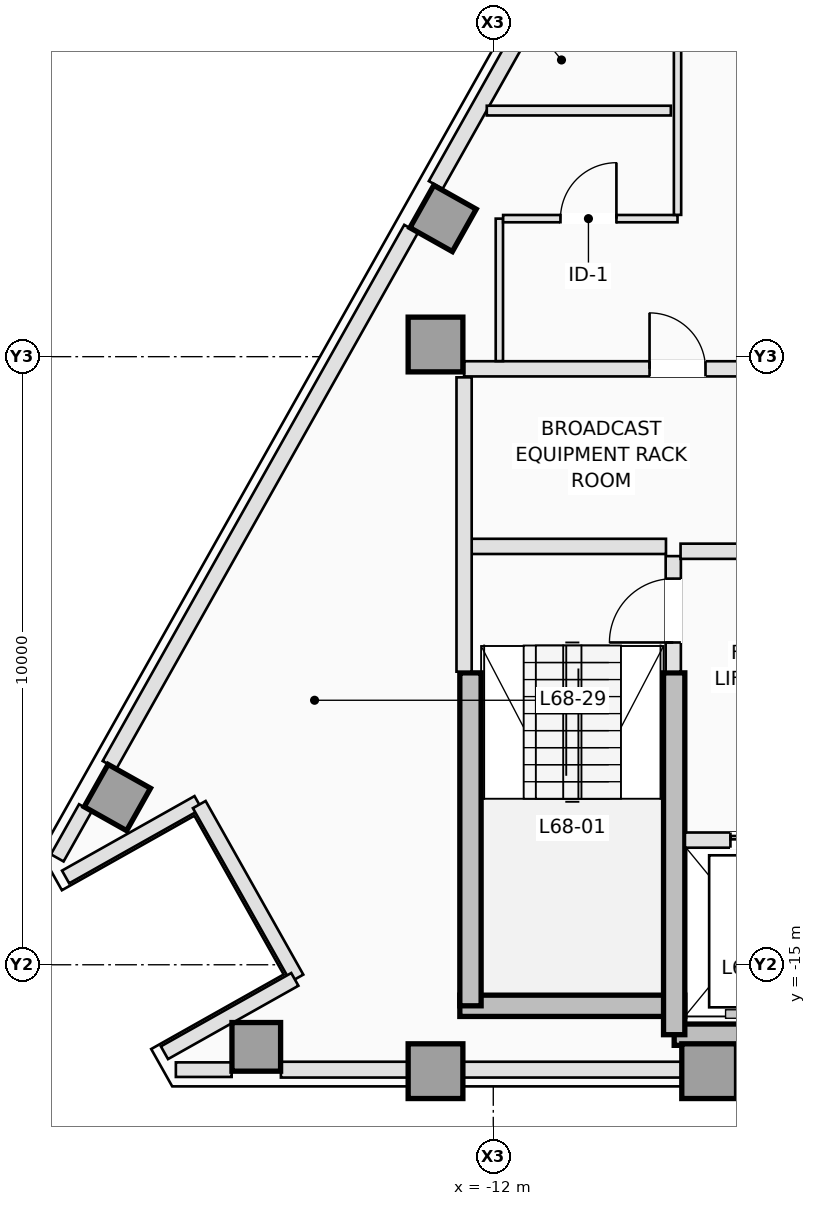
"""IFC4 building model, lengths in metres.
Left out: names, types, materials, properties, quantities, classifications, styles, units other than length and angle.
Written with IfcOpenShell. Run it as: python <this file> out.ifc"""

import sys

from ifc_helpers import new_model, si_unit, direction, frame, frame_2d, origin, origin_2d, place, context, subcontext, project, spatial, rectangle, extrude, element, fill, save


model = new_model("IFC4")
c1 = context("Model", 3, precision=1e-05, world=origin(), true_north=direction((0.0, 1.0)))
c2 = subcontext(c1, "Body", "Model", "MODEL_VIEW")
j1 = project(units=[si_unit("LENGTHUNIT", "METRE"), si_unit("PLANEANGLEUNIT", "RADIAN")], contexts=[c1])
p1 = place(None, origin())
s1 = spatial("IfcSite", under=j1, at=p1, CompositionType="ELEMENT")
p2 = place(p1, origin())
s2 = spatial("IfcBuilding", under=s1, at=p2, CompositionType="ELEMENT")
p3 = place(p2, frame((0.0, 0.0, 246.4)))
s3 = spatial("IfcBuildingStorey", under=s2, at=p3, CompositionType="ELEMENT", Elevation=246.4)
p4 = place(p3, frame((-12.55, -15.675, 0.0), z_axis=(0.0, 0.0, 1.0), x_axis=(1.0, 0.0, 0.0)))
e1 = element("IfcWall", 1, at=p4, inside=s3, PredefinedType="SHEAR", context=c2, shape_type="SweptSolid", body=[
    extrude(rectangle(XDim=3.7, YDim=0.35, at=frame_2d((1.85, 0.0))), origin(), (0.0, 0.0, 1.0), 3.5),
])
p5 = place(p3, frame((-9.025, -16.15, 0.0), z_axis=(0.0, 0.0, 1.0), x_axis=(1.0, 0.0, 0.0)))
e2 = element("IfcWall", 2, at=p5, inside=s3, PredefinedType="SHEAR", context=c2, shape_type="SweptSolid", body=[
    extrude(rectangle(XDim=5.275, YDim=0.35, at=frame_2d((2.637, 0.0))), origin(), (0.0, 0.0, 1.0), 3.5),
])
p6 = place(p3, frame((-12.375, -15.675, 0.0), z_axis=(0.0, 0.0, 1.0), x_axis=(0.0, 1.0, 0.0)))
e3 = element("IfcWall", 3, at=p6, inside=s3, PredefinedType="SHEAR", context=c2, shape_type="SweptSolid", body=[
    extrude(rectangle(XDim=5.475, YDim=0.35, at=frame_2d((2.738, 0.0))), origin(), (0.0, 0.0, 1.0), 3.5),
])
p7 = place(p3, frame((-9.025, -16.15, 0.0), z_axis=(0.0, 0.0, 1.0), x_axis=(0.0, 1.0, 0.0)))
e4 = element("IfcWall", 4, at=p7, inside=s3, PredefinedType="SHEAR", context=c2, shape_type="SweptSolid", body=[
    extrude(rectangle(XDim=5.95, YDim=0.35, at=frame_2d((2.975, 0.0))), origin(), (0.0, 0.0, 1.0), 3.5),
])
for number, where, z_axis, x_axis in (
    (5, (-12.95, -16.75, 0.0), (0.0, 0.0, 1.0), (1.0, 0.0, 0.0)),
    (6, (-8.45, -16.75, 0.0), (0.0, 0.0, 1.0), (1.0, 0.0, 0.0)),
    (7, (-12.95, -4.8, 0.0), (0.0, 0.0, 1.0), (1.0, 0.0, 0.0)),
):
    element("IfcColumn", number, at=place(p3, frame(where, z_axis=z_axis, x_axis=x_axis)), inside=s3, PredefinedType="COLUMN", context=c2, shape_type="SweptSolid", body=[
        extrude(rectangle(XDim=0.9, YDim=0.9, at=origin_2d()), origin(), (0.0, 0.0, 1.0), 3.5),
    ])
for number, where, z_axis, x_axis in (
    (8, (-15.898, -16.35, 0.0), (0.0, 0.0, 1.0), (0.0, 1.0, 0.0)),
    (9, (-12.825, -2.727, 0.0), (0.0, 0.0, 1.0), (-0.872, 0.49, 0.0)),
    (10, (-18.182, -12.25, 0.0), (0.0, 0.0, 1.0), (-0.872, 0.49, 0.0)),
):
    element("IfcColumn", number, at=place(p3, frame(where, z_axis=z_axis, x_axis=x_axis)), inside=s3, PredefinedType="COLUMN", context=c2, shape_type="SweptSolid", body=[
        extrude(rectangle(XDim=0.8, YDim=0.8, at=origin_2d()), origin(), (0.0, 0.0, 1.0), 3.5),
    ])
p8 = place(p3, frame((-16.302, -16.725, 0.0), z_axis=(0.0, 0.0, 1.0), x_axis=(-1.0, 0.0, 0.0)))
e11 = element("IfcWall", 11, at=p8, inside=s3, PredefinedType="STANDARD", context=c2, shape_type="SweptSolid", body=[
    extrude(rectangle(XDim=0.917, YDim=0.24, at=frame_2d((0.459, 0.0))), origin(), (0.0, 0.0, 1.0), 3.25),
])
p9 = place(p3, frame((-4.22, -16.725, 0.0), z_axis=(0.0, 0.0, 1.0), x_axis=(-1.0, 0.0, 0.0)))
e12 = element("IfcWall", 12, at=p9, inside=s3, PredefinedType="STANDARD", context=c2, shape_type="SweptSolid", body=[
    extrude(rectangle(XDim=11.273, YDim=0.26, at=frame_2d((5.636, 0.0))), origin(), (0.0, 0.0, 1.0), 2.79),
])
p10 = place(p3, frame((-19.171, -13.242, 0.0), z_axis=(0.0, 0.0, 1.0), x_axis=(0.490199895283, 0.871610040479, 0.0)))
e13 = element("IfcWall", 13, at=p10, inside=s3, PredefinedType="STANDARD", context=c2, shape_type="SweptSolid", body=[
    extrude(rectangle(XDim=0.945, YDim=0.24, at=frame_2d((0.472, 0.0))), origin(), (0.0, 0.0, 1.0), 3.25),
])
p11 = place(p3, frame((-18.311, -11.713, 0.0), z_axis=(0.0, 0.0, 1.0), x_axis=(0.490266968583, 0.871572314565, 0.0)))
e14 = element("IfcWall", 14, at=p11, inside=s3, PredefinedType="STANDARD", context=c2, shape_type="SweptSolid", body=[
    extrude(rectangle(XDim=10.116, YDim=0.26, at=frame_2d((5.058, 0.0))), origin(), (0.0, 0.0, 1.0), 3.25),
])
p12 = place(p3, frame((-12.946, -2.177, 0.0), z_axis=(0.0, 0.0, 1.0), x_axis=(0.490244825075, 0.871584770109, 0.0)))
e15 = element("IfcWall", 15, at=p12, inside=s3, PredefinedType="STANDARD", context=c2, shape_type="SweptSolid", body=[
    extrude(rectangle(XDim=4.237, YDim=0.26, at=frame_2d((2.119, 0.0))), origin(), (0.0, 0.0, 1.0), 3.25),
])
p13 = place(p3, frame((-19.033, -13.556, 0.0), z_axis=(0.0, 0.0, 1.0), x_axis=(0.871588577066, 0.490238056792, 0.0)))
e16 = element("IfcWall", 16, at=p13, inside=s3, PredefinedType="STANDARD", context=c2, shape_type="SweptSolid", body=[
    extrude(rectangle(XDim=2.5, YDim=0.24, at=frame_2d((1.25, 0.0))), origin(), (0.0, 0.0, 1.0), 3.25),
])
p14 = place(p3, frame((-16.835, -12.366, 0.0), z_axis=(0.0, 0.0, 1.0), x_axis=(0.490293083368, -0.871557624258, 0.0)))
e17 = element("IfcWall", 17, at=p14, inside=s3, PredefinedType="STANDARD", context=c2, shape_type="SweptSolid", body=[
    extrude(rectangle(XDim=3.276, YDim=0.24, at=frame_2d((1.638, 0.0))), origin(), (0.0, 0.0, 1.0), 2.79),
])
p15 = place(p3, frame((-15.264, -15.24, 0.0), z_axis=(0.0, 0.0, 1.0), x_axis=(-0.87157023615, -0.490270663468, 0.0)))
e18 = element("IfcWall", 18, at=p15, inside=s3, PredefinedType="STANDARD", context=c2, shape_type="SweptSolid", body=[
    extrude(rectangle(XDim=2.46, YDim=0.24, at=frame_2d((1.23, 0.0))), origin(), (0.0, 0.0, 1.0), 3.25),
])
p16 = place(p3, frame((-9.04, -10.18, 0.0), z_axis=(0.0, 0.0, 1.0), x_axis=(0.0, 1.0, 0.0)))
e19 = element("IfcWall", 19, at=p16, inside=s3, PredefinedType="PARTITIONING", context=c2, shape_type="SweptSolid", body=[
    extrude(rectangle(XDim=1.9, YDim=0.25, at=frame_2d((0.95, 0.0))), origin(), (0.0, 0.0, 1.0), 3.25),
])
p17 = place(p16, frame((0.48, 0.0, 0.0)))
e20 = element("IfcOpeningElement", 20, at=p17, cuts=e19, PredefinedType="OPENING", context=c2, shape_type="SweptSolid", body=[
    extrude(rectangle(XDim=1.05, YDim=2.15, at=frame_2d((0.525, 1.075))), frame((0.0, 0.135, 0.0), z_axis=(0.0, -1.0, 0.0), x_axis=(1.0, 0.0, 0.0)), (0.0, 0.0, 1.0), 0.27),
])
p18 = place(p3, frame((-12.38, -8.12, 0.0), z_axis=(0.0, 0.0, 1.0), x_axis=(1.0, 0.0, 0.0)))
e21 = element("IfcWall", 21, at=p18, inside=s3, PredefinedType="PARTITIONING", context=c2, shape_type="SweptSolid", body=[
    extrude(rectangle(XDim=3.22, YDim=0.25, at=frame_2d((1.61, 0.0))), origin(), (0.0, 0.0, 1.0), 3.25),
])
p19 = place(p3, frame((-12.48, -10.18, 0.0), z_axis=(0.0, 0.0, 1.0), x_axis=(0.0, 1.0, 0.0)))
e22 = element("IfcWall", 22, at=p19, inside=s3, PredefinedType="PARTITIONING", context=c2, shape_type="SweptSolid", body=[
    extrude(rectangle(XDim=4.84, YDim=0.25, at=frame_2d((2.42, 0.0))), origin(), (0.0, 0.0, 1.0), 3.25),
])
p20 = place(p3, frame((-8.848, -12.95, 0.0), z_axis=(0.0, 0.0, 1.0), x_axis=(1.0, 0.0, 0.0)))
e23 = element("IfcWall", 23, at=p20, inside=s3, PredefinedType="PARTITIONING", context=c2, shape_type="SweptSolid", body=[
    extrude(rectangle(XDim=5.168, YDim=0.25, at=frame_2d((2.584, 0.0))), origin(), (0.0, 0.0, 1.0), 3.25),
])
p21 = place(p20, frame((0.748, 0.0, 0.0)))
e24 = element("IfcOpeningElement", 24, at=p21, cuts=e23, PredefinedType="OPENING", context=c2, shape_type="SweptSolid", body=[
    extrude(rectangle(XDim=1.1, YDim=2.15, at=frame_2d((0.55, 1.075))), frame((0.0, 0.135, 0.0), z_axis=(0.0, -1.0, 0.0), x_axis=(1.0, 0.0, 0.0)), (0.0, 0.0, 1.0), 0.27),
])
p22 = place(p20, frame((2.648, 0.0, 0.0)))
e25 = element("IfcOpeningElement", 25, at=p22, cuts=e23, PredefinedType="OPENING", context=c2, shape_type="SweptSolid", body=[
    extrude(rectangle(XDim=0.88, YDim=2.1, at=frame_2d((0.44, 1.05))), frame((0.0, 0.135, 0.0), z_axis=(0.0, -1.0, 0.0), x_axis=(1.0, 0.0, 0.0)), (0.0, 0.0, 1.0), 0.27),
])
p23 = place(p20, frame((4.048, 0.0, 0.0)))
e26 = element("IfcOpeningElement", 26, at=p23, cuts=e23, PredefinedType="OPENING", context=c2, shape_type="SweptSolid", body=[
    extrude(rectangle(XDim=0.88, YDim=2.1, at=frame_2d((0.44, 1.05))), frame((0.0, 0.135, 0.0), z_axis=(0.0, -1.0, 0.0), x_axis=(1.0, 0.0, 0.0)), (0.0, 0.0, 1.0), 0.27),
])
p24 = place(p3, frame((-8.92, -8.2, 0.0), z_axis=(0.0, 0.0, 1.0), x_axis=(1.0, 0.0, 0.0)))
e27 = element("IfcWall", 27, at=p24, inside=s3, PredefinedType="PARTITIONING", context=c2, shape_type="SweptSolid", body=[
    extrude(rectangle(XDim=5.24, YDim=0.25, at=frame_2d((2.62, 0.0))), origin(), (0.0, 0.0, 1.0), 3.25),
])
p25 = place(p3, frame((-12.48, -5.2, 0.0), z_axis=(0.0, 0.0, 1.0), x_axis=(1.0, 0.0, 0.0)))
e28 = element("IfcWall", 28, at=p25, inside=s3, PredefinedType="PARTITIONING", context=c2, shape_type="SweptSolid", body=[
    extrude(rectangle(XDim=8.278, YDim=0.25, at=frame_2d((4.139, 0.0))), origin(), (0.0, 0.0, 1.0), 3.25),
])
p26 = place(p25, frame((3.05, 0.0, 0.0)))
e29 = element("IfcOpeningElement", 29, at=p26, cuts=e28, PredefinedType="OPENING", context=c2, shape_type="SweptSolid", body=[
    extrude(rectangle(XDim=0.92, YDim=2.12, at=frame_2d((0.46, 1.06))), frame((0.0, 0.135, 0.0), z_axis=(0.0, -1.0, 0.0), x_axis=(1.0, 0.0, 0.0)), (0.0, 0.0, 1.0), 0.27),
])
p27 = place(p25, frame((6.15, 0.0, 0.0)))
e30 = element("IfcOpeningElement", 30, at=p27, cuts=e28, PredefinedType="OPENING", context=c2, shape_type="SweptSolid", body=[
    extrude(rectangle(XDim=0.92, YDim=2.12, at=frame_2d((0.46, 1.06))), frame((0.0, 0.135, 0.0), z_axis=(0.0, -1.0, 0.0), x_axis=(1.0, 0.0, 0.0)), (0.0, 0.0, 1.0), 0.27),
])
p28 = place(p3, frame((-11.9, -5.073, 0.0), z_axis=(0.0, 0.0, 1.0), x_axis=(0.0, 1.0, 0.0)))
e31 = element("IfcWall", 31, at=p28, inside=s3, PredefinedType="PARTITIONING", context=c2, shape_type="SweptSolid", body=[
    extrude(rectangle(XDim=2.343, YDim=0.12, at=frame_2d((1.171, 0.0))), origin(), (0.0, 0.0, 1.0), 3.25),
])
p29 = place(p3, frame((-11.838, -2.73, 0.0), z_axis=(0.0, 0.0, 1.0), x_axis=(1.0, 0.0, 0.0)))
e32 = element("IfcWall", 32, at=p29, inside=s3, PredefinedType="PARTITIONING", context=c2, shape_type="SweptSolid", body=[
    extrude(rectangle(XDim=2.868, YDim=0.12, at=frame_2d((1.434, 0.0))), origin(), (0.0, 0.0, 1.0), 3.25),
])
p30 = place(p29, frame((0.943, 0.0, 0.0)))
e33 = element("IfcOpeningElement", 33, at=p30, cuts=e32, PredefinedType="OPENING", context=c2, shape_type="SweptSolid", body=[
    extrude(rectangle(XDim=0.92, YDim=2.12, at=frame_2d((0.46, 1.06))), frame((0.0, 0.07, 0.0), z_axis=(0.0, -1.0, 0.0), x_axis=(1.0, 0.0, 0.0)), (0.0, 0.0, 1.0), 0.14),
])
p31 = place(p3, frame((-8.97, -2.668, 0.0), z_axis=(0.0, 0.0, 1.0), x_axis=(0.0, 1.0, 0.0)))
e34 = element("IfcWall", 34, at=p31, inside=s3, PredefinedType="PARTITIONING", context=c2, shape_type="SweptSolid", body=[
    extrude(rectangle(XDim=5.286, YDim=0.12, at=frame_2d((2.643, 0.0))), origin(), (0.0, 0.0, 1.0), 3.25),
])
p32 = place(p31, frame((2.791, 0.0, 0.0)))
e35 = element("IfcOpeningElement", 35, at=p32, cuts=e34, PredefinedType="OPENING", context=c2, shape_type="SweptSolid", body=[
    extrude(rectangle(XDim=0.92, YDim=2.12, at=frame_2d((0.46, 1.06))), frame((0.0, 0.07, 0.0), z_axis=(0.0, -1.0, 0.0), x_axis=(1.0, 0.0, 0.0)), (0.0, 0.0, 1.0), 0.14),
])
p33 = place(p3, frame((-9.08, -0.953, 0.0), z_axis=(0.0, 0.0, 1.0), x_axis=(-1.0, 0.0, 0.0)))
e36 = element("IfcWall", 36, at=p33, inside=s3, PredefinedType="PARTITIONING", context=c2, shape_type="SweptSolid", body=[
    extrude(rectangle(XDim=3.027, YDim=0.16, at=frame_2d((1.513, 0.0))), origin(), (0.0, 0.0, 1.0), 3.25),
])
p34 = place(p21, origin())
e37 = element("IfcDoor", 37, at=p34, inside=s3, OperationType="SLIDING_TO_LEFT", PredefinedType="DOOR", context=c2, shape_type="SweptSolid", body=[
    extrude(rectangle(XDim=1.1, YDim=2.15, at=frame_2d((0.55, 1.075))), frame((0.0, 0.025, 0.0), z_axis=(0.0, -1.0, 0.0), x_axis=(1.0, 0.0, 0.0)), (0.0, 0.0, 1.0), 0.05),
])
fill(e24, e37)
p35 = place(p17, origin())
e38 = element("IfcDoor", 38, at=p35, inside=s3, OperationType="SINGLE_SWING_LEFT", PredefinedType="DOOR", context=c2, shape_type="SweptSolid", body=[
    extrude(rectangle(XDim=1.05, YDim=2.15, at=frame_2d((0.525, 1.075))), frame((0.0, 0.025, 0.0), z_axis=(0.0, -1.0, 0.0), x_axis=(1.0, 0.0, 0.0)), (0.0, 0.0, 1.0), 0.05),
])
fill(e20, e38)
p36 = place(p26, origin())
e39 = element("IfcDoor", 39, at=p36, inside=s3, OperationType="SINGLE_SWING_LEFT", PredefinedType="DOOR", context=c2, shape_type="SweptSolid", body=[
    extrude(rectangle(XDim=0.92, YDim=2.12, at=frame_2d((0.46, 1.06))), frame((0.0, 0.025, 0.0), z_axis=(0.0, -1.0, 0.0), x_axis=(1.0, 0.0, 0.0)), (0.0, 0.0, 1.0), 0.05),
])
fill(e29, e39)
p37 = place(p30, origin())
e40 = element("IfcDoor", 40, at=p37, inside=s3, OperationType="SINGLE_SWING_RIGHT", PredefinedType="DOOR", context=c2, shape_type="SweptSolid", body=[
    extrude(rectangle(XDim=0.92, YDim=2.12, at=frame_2d((0.46, 1.06))), frame((0.0, 0.025, 0.0), z_axis=(0.0, -1.0, 0.0), x_axis=(1.0, 0.0, 0.0)), (0.0, 0.0, 1.0), 0.05),
])
fill(e33, e40)
save(model, sys.argv[1])
